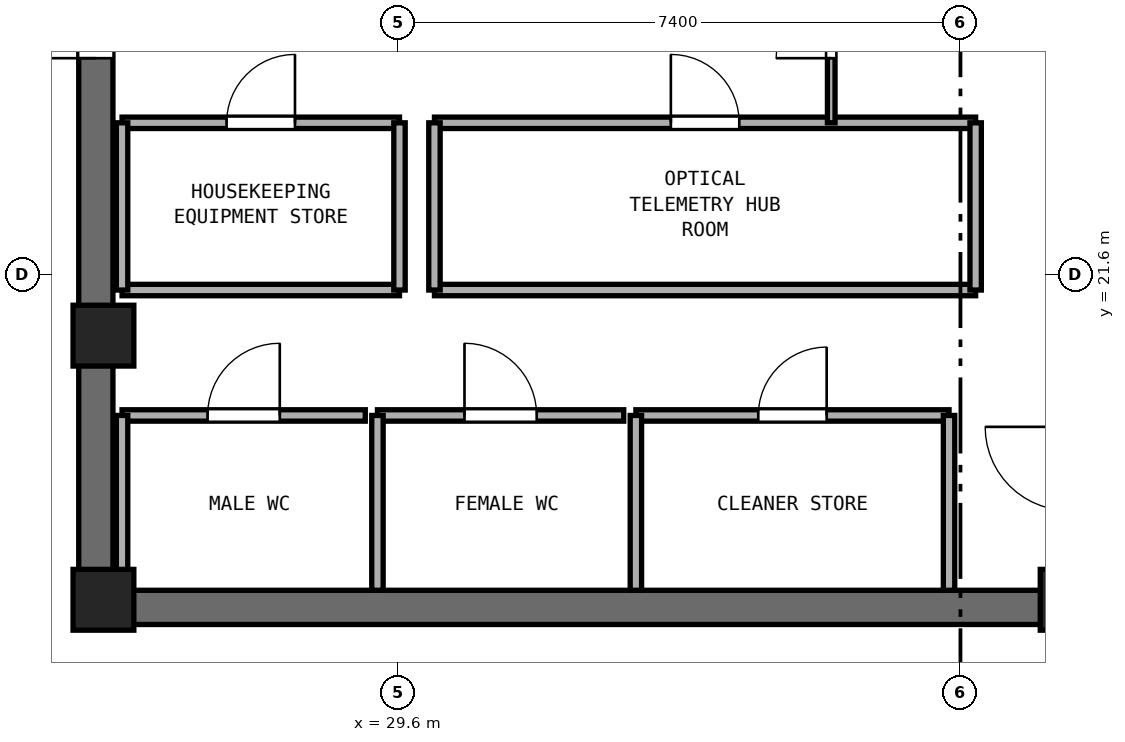
"""IFC4 building model, lengths in metres.
Left out: names, types, materials, properties, quantities, classifications, styles, units other than length and angle.
Written with IfcOpenShell. Run it as: python <this file> out.ifc"""

import sys

from ifc_helpers import new_model, si_unit, direction, frame, frame_2d, origin, origin_2d, place, context, subcontext, project, spatial, rectangle, extrude, element, fill, save


model = new_model("IFC4")
c1 = context("Model", 3, precision=1e-05, world=origin(), true_north=direction((0.0, 1.0)))
c2 = subcontext(c1, "Body", "Model", "MODEL_VIEW")
j1 = project(units=[si_unit("LENGTHUNIT", "METRE"), si_unit("PLANEANGLEUNIT", "RADIAN")], contexts=[c1])
p1 = place(None, origin())
s1 = spatial("IfcSite", under=j1, at=p1, CompositionType="ELEMENT")
p2 = place(p1, origin())
s2 = spatial("IfcBuilding", under=s1, at=p2, CompositionType="ELEMENT")
p3 = place(p2, frame((0.0, 0.0, 236.4)))
s3 = spatial("IfcBuildingStorey", under=s2, at=p3, CompositionType="ELEMENT", Elevation=236.4)
p4 = place(p3, frame((25.4, 17.225, 0.0), z_axis=(0.0, 0.0, 1.0), x_axis=(1.0, 0.0, 0.0)))
e1 = element("IfcWall", 1, at=p4, inside=s3, PredefinedType="SHEAR", context=c2, shape_type="SweptSolid", body=[
    extrude(rectangle(XDim=23.2, YDim=0.45, at=frame_2d((11.6, 0.0))), origin(), (0.0, 0.0, 1.0), 3.51),
])
p5 = place(p3, frame((25.625, 17.45, 0.0), z_axis=(0.0, 0.0, 1.0), x_axis=(0.0, 1.0, 0.0)))
e2 = element("IfcWall", 2, at=p5, inside=s3, PredefinedType="SHEAR", context=c2, shape_type="SweptSolid", body=[
    extrude(rectangle(XDim=15.5, YDim=0.45, at=frame_2d((7.75, 0.0))), origin(), (0.0, 0.0, 1.0), 3.51),
])
p6 = place(p5, frame((7.0, 0.0, 0.0)))
e3 = element("IfcOpeningElement", 3, at=p6, cuts=e2, PredefinedType="OPENING", context=c2, shape_type="SweptSolid", body=[
    extrude(rectangle(XDim=1.5, YDim=2.15, at=frame_2d((0.75, 1.075))), frame((0.0, 0.235, 0.0), z_axis=(0.0, -1.0, 0.0), x_axis=(1.0, 0.0, 0.0)), (0.0, 0.0, 1.0), 0.47),
])
for number, where, z_axis, x_axis in (
    (4, (25.725, 17.325, 0.0), (0.0, 0.0, 1.0), (1.0, 0.0, 0.0)),
    (5, (38.45, 17.325, 0.0), (0.0, 0.0, 1.0), (1.0, 0.0, 0.0)),
    (6, (25.725, 20.8, 0.0), (0.0, 0.0, 1.0), (1.0, 0.0, 0.0)),
):
    element("IfcColumn", number, at=place(p3, frame(where, z_axis=z_axis, x_axis=x_axis)), inside=s3, PredefinedType="PILASTER", context=c2, shape_type="SweptSolid", body=[
        extrude(rectangle(XDim=0.8, YDim=0.8, at=origin_2d()), origin(), (0.0, 0.0, 1.0), 3.8),
    ])
p7 = place(p3, frame((25.97, 19.75, 0.0), z_axis=(0.0, 0.0, 1.0), x_axis=(1.0, 0.0, 0.0)))
e7 = element("IfcWall", 7, at=p7, inside=s3, PredefinedType="PARTITIONING", context=c2, shape_type="SweptSolid", body=[
    extrude(rectangle(XDim=3.2, YDim=0.15, at=frame_2d((1.6, 0.0))), origin(), (0.0, 0.0, 1.0), 3.51),
])
p8 = place(p7, frame((1.125, 0.0, 0.0)))
e8 = element("IfcOpeningElement", 8, at=p8, cuts=e7, PredefinedType="OPENING", context=c2, shape_type="SweptSolid", body=[
    extrude(rectangle(XDim=0.95, YDim=2.1, at=frame_2d((0.475, 1.05))), frame((0.0, 0.085, 0.0), z_axis=(0.0, -1.0, 0.0), x_axis=(1.0, 0.0, 0.0)), (0.0, 0.0, 1.0), 0.17),
])
p9 = place(p3, frame((25.97, 17.45, 0.0), z_axis=(0.0, 0.0, 1.0), x_axis=(0.0, 1.0, 0.0)))
e9 = element("IfcWall", 9, at=p9, inside=s3, PredefinedType="PARTITIONING", context=c2, shape_type="SweptSolid", body=[
    extrude(rectangle(XDim=2.3, YDim=0.15, at=frame_2d((1.15, 0.0))), origin(), (0.0, 0.0, 1.0), 2.61),
])
p10 = place(p3, frame((29.33, 19.75, 0.0), z_axis=(0.0, 0.0, 1.0), x_axis=(1.0, 0.0, 0.0)))
e10 = element("IfcWall", 10, at=p10, inside=s3, PredefinedType="PARTITIONING", context=c2, shape_type="SweptSolid", body=[
    extrude(rectangle(XDim=3.24, YDim=0.15, at=frame_2d((1.62, 0.0))), origin(), (0.0, 0.0, 1.0), 3.51),
])
p11 = place(p10, frame((1.145, 0.0, 0.0)))
e11 = element("IfcOpeningElement", 11, at=p11, cuts=e10, PredefinedType="OPENING", context=c2, shape_type="SweptSolid", body=[
    extrude(rectangle(XDim=0.95, YDim=2.1, at=frame_2d((0.475, 1.05))), frame((0.0, 0.085, 0.0), z_axis=(0.0, -1.0, 0.0), x_axis=(1.0, 0.0, 0.0)), (0.0, 0.0, 1.0), 0.17),
])
p12 = place(p3, frame((29.33, 17.45, 0.0), z_axis=(0.0, 0.0, 1.0), x_axis=(0.0, 1.0, 0.0)))
e12 = element("IfcWall", 12, at=p12, inside=s3, PredefinedType="PARTITIONING", context=c2, shape_type="SweptSolid", body=[
    extrude(rectangle(XDim=2.3, YDim=0.15, at=frame_2d((1.15, 0.0))), origin(), (0.0, 0.0, 1.0), 3.51),
])
p13 = place(p3, frame((32.73, 19.75, 0.0), z_axis=(0.0, 0.0, 1.0), x_axis=(1.0, 0.0, 0.0)))
e13 = element("IfcWall", 13, at=p13, inside=s3, PredefinedType="PARTITIONING", context=c2, shape_type="SweptSolid", body=[
    extrude(rectangle(XDim=4.12, YDim=0.15, at=frame_2d((2.06, 0.0))), origin(), (0.0, 0.0, 1.0), 3.51),
])
p14 = place(p13, frame((1.61, 0.0, 0.0)))
e14 = element("IfcOpeningElement", 14, at=p14, cuts=e13, PredefinedType="OPENING", context=c2, shape_type="SweptSolid", body=[
    extrude(rectangle(XDim=0.9, YDim=2.1, at=frame_2d((0.45, 1.05))), frame((0.0, 0.085, 0.0), z_axis=(0.0, -1.0, 0.0), x_axis=(1.0, 0.0, 0.0)), (0.0, 0.0, 1.0), 0.17),
])
for number, where, z_axis, x_axis in (
    (15, (32.73, 17.45, 0.0), (0.0, 0.0, 1.0), (0.0, 1.0, 0.0)),
    (16, (36.85, 17.45, 0.0), (0.0, 0.0, 1.0), (0.0, 1.0, 0.0)),
):
    element("IfcWall", number, at=place(p3, frame(where, z_axis=z_axis, x_axis=x_axis)), inside=s3, PredefinedType="PARTITIONING", context=c2, shape_type="SweptSolid", body=[
        extrude(rectangle(XDim=2.3, YDim=0.15, at=frame_2d((1.15, 0.0))), origin(), (0.0, 0.0, 1.0), 3.51),
    ])
p15 = place(p3, frame((25.97, 21.4, 0.0), z_axis=(0.0, 0.0, 1.0), x_axis=(1.0, 0.0, 0.0)))
e17 = element("IfcWall", 17, at=p15, inside=s3, PredefinedType="PARTITIONING", context=c2, shape_type="SweptSolid", body=[
    extrude(rectangle(XDim=3.65, YDim=0.15, at=frame_2d((1.825, 0.0))), origin(), (0.0, 0.0, 1.0), 3.51),
])
p16 = place(p3, frame((25.97, 23.6, 0.0), z_axis=(0.0, 0.0, 1.0), x_axis=(1.0, 0.0, 0.0)))
e18 = element("IfcWall", 18, at=p16, inside=s3, PredefinedType="PARTITIONING", context=c2, shape_type="SweptSolid", body=[
    extrude(rectangle(XDim=3.65, YDim=0.15, at=frame_2d((1.825, 0.0))), origin(), (0.0, 0.0, 1.0), 3.51),
])
p17 = place(p16, frame((1.375, 0.0, 0.0)))
e19 = element("IfcOpeningElement", 19, at=p17, cuts=e18, PredefinedType="OPENING", context=c2, shape_type="SweptSolid", body=[
    extrude(rectangle(XDim=0.9, YDim=2.1, at=frame_2d((0.45, 1.05))), frame((0.0, 0.085, 0.0), z_axis=(0.0, -1.0, 0.0), x_axis=(1.0, 0.0, 0.0)), (0.0, 0.0, 1.0), 0.17),
])
p18 = place(p3, frame((25.97, 21.4, 0.0), z_axis=(0.0, 0.0, 1.0), x_axis=(0.0, 1.0, 0.0)))
e20 = element("IfcWall", 20, at=p18, inside=s3, PredefinedType="PARTITIONING", context=c2, shape_type="SweptSolid", body=[
    extrude(rectangle(XDim=2.2, YDim=0.15, at=frame_2d((1.1, 0.0))), origin(), (0.0, 0.0, 1.0), 2.61),
])
p19 = place(p3, frame((29.62, 21.4, 0.0), z_axis=(0.0, 0.0, 1.0), x_axis=(0.0, 1.0, 0.0)))
e21 = element("IfcWall", 21, at=p19, inside=s3, PredefinedType="PARTITIONING", context=c2, shape_type="SweptSolid", body=[
    extrude(rectangle(XDim=2.2, YDim=0.15, at=frame_2d((1.1, 0.0))), origin(), (0.0, 0.0, 1.0), 3.51),
])
p20 = place(p3, frame((30.08, 21.4, 0.0), z_axis=(0.0, 0.0, 1.0), x_axis=(1.0, 0.0, 0.0)))
e22 = element("IfcWall", 22, at=p20, inside=s3, PredefinedType="PARTITIONING", context=c2, shape_type="SweptSolid", body=[
    extrude(rectangle(XDim=7.12, YDim=0.15, at=frame_2d((3.56, 0.0))), origin(), (0.0, 0.0, 1.0), 3.51),
])
p21 = place(p3, frame((30.08, 23.6, 0.0), z_axis=(0.0, 0.0, 1.0), x_axis=(1.0, 0.0, 0.0)))
e23 = element("IfcWall", 23, at=p21, inside=s3, PredefinedType="PARTITIONING", context=c2, shape_type="SweptSolid", body=[
    extrude(rectangle(XDim=7.12, YDim=0.15, at=frame_2d((3.56, 0.0))), origin(), (0.0, 0.0, 1.0), 3.51),
])
p22 = place(p21, frame((3.11, 0.0, 0.0)))
e24 = element("IfcOpeningElement", 24, at=p22, cuts=e23, PredefinedType="OPENING", context=c2, shape_type="SweptSolid", body=[
    extrude(rectangle(XDim=0.9, YDim=2.1, at=frame_2d((0.45, 1.05))), frame((0.0, 0.085, 0.0), z_axis=(0.0, -1.0, 0.0), x_axis=(1.0, 0.0, 0.0)), (0.0, 0.0, 1.0), 0.17),
])
for number, where, z_axis, x_axis in (
    (25, (30.08, 21.4, 0.0), (0.0, 0.0, 1.0), (0.0, 1.0, 0.0)),
    (26, (37.2, 21.4, 0.0), (0.0, 0.0, 1.0), (0.0, 1.0, 0.0)),
):
    element("IfcWall", number, at=place(p3, frame(where, z_axis=z_axis, x_axis=x_axis)), inside=s3, PredefinedType="PARTITIONING", context=c2, shape_type="SweptSolid", body=[
        extrude(rectangle(XDim=2.2, YDim=0.15, at=frame_2d((1.1, 0.0))), origin(), (0.0, 0.0, 1.0), 3.51),
    ])
p23 = place(p3, frame((35.3, 23.6, 0.0), z_axis=(0.0, 0.0, 1.0), x_axis=(0.0, 1.0, 0.0)))
e27 = element("IfcWall", 27, at=p23, inside=s3, PredefinedType="PARTITIONING", context=c2, shape_type="SweptSolid", body=[
    extrude(rectangle(XDim=3.2, YDim=0.1, at=frame_2d((1.6, 0.0))), origin(), (0.0, 0.0, 1.0), 3.51),
])
p24 = place(p23, frame((0.85, 0.0, 0.0)))
e28 = element("IfcOpeningElement", 28, at=p24, cuts=e27, PredefinedType="OPENING", context=c2, shape_type="SweptSolid", body=[
    extrude(rectangle(XDim=1.45, YDim=2.12, at=frame_2d((0.725, 1.06))), frame((0.0, 0.06, 0.0), z_axis=(0.0, -1.0, 0.0), x_axis=(1.0, 0.0, 0.0)), (0.0, 0.0, 1.0), 0.12),
])
p25 = place(p6, origin())
e29 = element("IfcDoor", 29, at=p25, inside=s3, OperationType="DOUBLE_DOOR_SINGLE_SWING", PredefinedType="DOOR", context=c2, shape_type="SweptSolid", body=[
    extrude(rectangle(XDim=1.5, YDim=2.15, at=frame_2d((0.75, 1.075))), frame((0.0, 0.025, 0.0), z_axis=(0.0, -1.0, 0.0), x_axis=(1.0, 0.0, 0.0)), (0.0, 0.0, 1.0), 0.05),
])
fill(e3, e29)
p26 = place(p8, origin())
e30 = element("IfcDoor", 30, at=p26, inside=s3, OperationType="SINGLE_SWING_RIGHT", PredefinedType="DOOR", context=c2, shape_type="SweptSolid", body=[
    extrude(rectangle(XDim=0.95, YDim=2.1, at=frame_2d((0.475, 1.05))), frame((0.0, 0.025, 0.0), z_axis=(0.0, -1.0, 0.0), x_axis=(1.0, 0.0, 0.0)), (0.0, 0.0, 1.0), 0.05),
])
fill(e8, e30)
p27 = place(p11, origin())
e31 = element("IfcDoor", 31, at=p27, inside=s3, OperationType="SINGLE_SWING_LEFT", PredefinedType="DOOR", context=c2, shape_type="SweptSolid", body=[
    extrude(rectangle(XDim=0.95, YDim=2.1, at=frame_2d((0.475, 1.05))), frame((0.0, 0.025, 0.0), z_axis=(0.0, -1.0, 0.0), x_axis=(1.0, 0.0, 0.0)), (0.0, 0.0, 1.0), 0.05),
])
fill(e11, e31)
p28 = place(p14, origin())
e32 = element("IfcDoor", 32, at=p28, inside=s3, OperationType="SINGLE_SWING_RIGHT", PredefinedType="DOOR", context=c2, shape_type="SweptSolid", body=[
    extrude(rectangle(XDim=0.9, YDim=2.1, at=frame_2d((0.45, 1.05))), frame((0.0, 0.025, 0.0), z_axis=(0.0, -1.0, 0.0), x_axis=(1.0, 0.0, 0.0)), (0.0, 0.0, 1.0), 0.05),
])
fill(e14, e32)
p29 = place(p17, origin())
e33 = element("IfcDoor", 33, at=p29, inside=s3, OperationType="SINGLE_SWING_RIGHT", PredefinedType="DOOR", context=c2, shape_type="SweptSolid", body=[
    extrude(rectangle(XDim=0.9, YDim=2.1, at=frame_2d((0.45, 1.05))), frame((0.0, 0.025, 0.0), z_axis=(0.0, -1.0, 0.0), x_axis=(1.0, 0.0, 0.0)), (0.0, 0.0, 1.0), 0.05),
])
fill(e19, e33)
p30 = place(p22, origin())
e34 = element("IfcDoor", 34, at=p30, inside=s3, OperationType="SINGLE_SWING_LEFT", PredefinedType="DOOR", context=c2, shape_type="SweptSolid", body=[
    extrude(rectangle(XDim=0.9, YDim=2.1, at=frame_2d((0.45, 1.05))), frame((0.0, 0.025, 0.0), z_axis=(0.0, -1.0, 0.0), x_axis=(1.0, 0.0, 0.0)), (0.0, 0.0, 1.0), 0.05),
])
fill(e24, e34)
p31 = place(p24, origin())
e35 = element("IfcDoor", 35, at=p31, inside=s3, OperationType="DOUBLE_DOOR_SINGLE_SWING", PredefinedType="DOOR", context=c2, shape_type="SweptSolid", body=[
    extrude(rectangle(XDim=1.45, YDim=2.12, at=frame_2d((0.725, 1.06))), frame((0.0, 0.025, 0.0), z_axis=(0.0, -1.0, 0.0), x_axis=(1.0, 0.0, 0.0)), (0.0, 0.0, 1.0), 0.05),
])
fill(e28, e35)
save(model, sys.argv[1])
